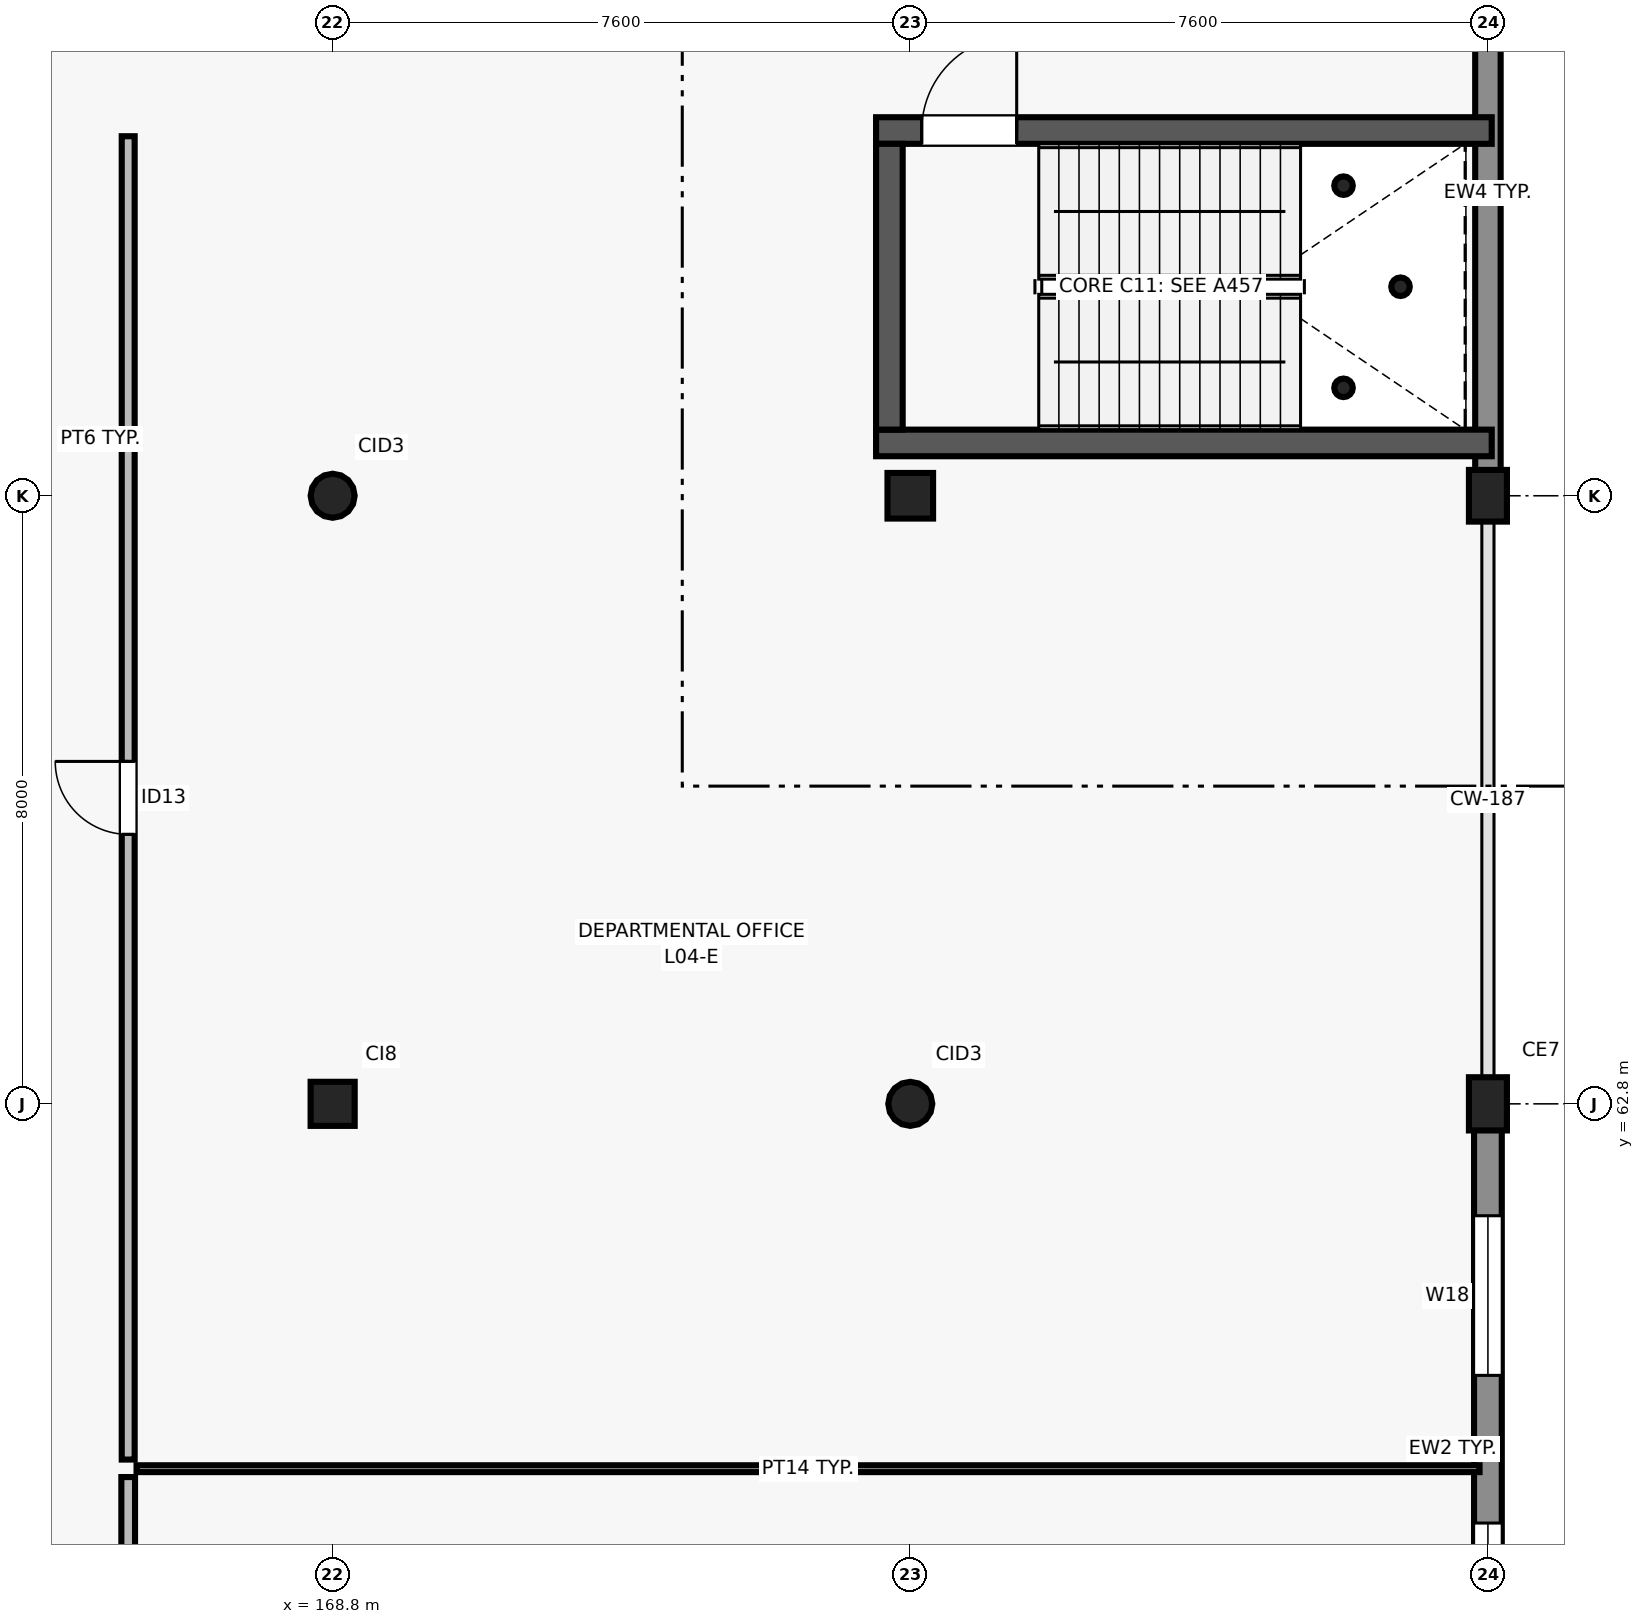
"""IFC4 building model, lengths in metres.
Left out: names, types, materials, properties, quantities, classifications, styles, units other than length and angle.
Written with IfcOpenShell. Run it as: python <this file> out.ifc"""

import sys

from ifc_helpers import new_model, si_unit, direction, frame, frame_2d, origin, origin_2d, place, context, subcontext, project, spatial, rectangle, circle, hollow_circle, extrude, element, fill, save


model = new_model("IFC4")
c1 = context("Model", 3, precision=1e-05, world=origin(), true_north=direction((0.0, 1.0)))
c2 = subcontext(c1, "Body", "Model", "MODEL_VIEW")
j1 = project(units=[si_unit("LENGTHUNIT", "METRE"), si_unit("PLANEANGLEUNIT", "RADIAN")], contexts=[c1])
p1 = place(None, origin())
s1 = spatial("IfcSite", under=j1, at=p1, CompositionType="ELEMENT")
p2 = place(p1, origin())
s2 = spatial("IfcBuilding", under=s1, at=p2, CompositionType="ELEMENT")
p3 = place(p2, frame((0.0, 0.0, 17.4)))
s3 = spatial("IfcBuildingStorey", under=s2, at=p3, CompositionType="ELEMENT", Elevation=17.4)
p4 = place(p3, frame((168.8, 62.8, 0.0), z_axis=(0.0, 0.0, 1.0), x_axis=(1.0, 0.0, 0.0)))
e1 = element("IfcColumn", 1, at=p4, inside=s3, PredefinedType="COLUMN", context=c2, shape_type="SweptSolid", body=[
    extrude(rectangle(XDim=0.58, YDim=0.58, at=origin_2d()), origin(), (0.0, 0.0, 1.0), 4.2),
])
for number, where, z_axis, x_axis in (
    (2, (168.8, 70.8, 0.0), (0.0, 0.0, 1.0), (1.0, 0.0, 0.0)),
    (3, (176.4, 62.8, 0.0), (0.0, 0.0, 1.0), (1.0, 0.0, 0.0)),
):
    element("IfcColumn", number, at=place(p3, frame(where, z_axis=z_axis, x_axis=x_axis)), inside=s3, PredefinedType="COLUMN", context=c2, shape_type="SweptSolid", body=[
        extrude(circle(Radius=0.29, at=origin_2d()), origin(), (0.0, 0.0, 1.0), 4.2),
    ])
p5 = place(p3, frame((176.4, 70.8, 0.0), z_axis=(0.0, 0.0, 1.0), x_axis=(1.0, 0.0, 0.0)))
e4 = element("IfcColumn", 4, at=p5, inside=s3, PredefinedType="COLUMN", context=c2, shape_type="SweptSolid", body=[
    extrude(rectangle(XDim=0.6, YDim=0.6, at=origin_2d()), origin(), (0.0, 0.0, 1.0), 4.2),
])
p6 = place(p3, frame((184.0, 62.8, 0.0), z_axis=(0.0, 0.0, 1.0), x_axis=(1.0, 0.0, 0.0)))
e5 = element("IfcColumn", 5, at=p6, inside=s3, PredefinedType="COLUMN", context=c2, shape_type="SweptSolid", body=[
    extrude(rectangle(XDim=0.7, YDim=0.5, at=origin_2d()), origin(), (0.0, 0.0, 1.0), 4.2),
])
p7 = place(p3, frame((184.0, 70.8, 0.0), z_axis=(0.0, 0.0, 1.0), x_axis=(1.0, 0.0, 0.0)))
e6 = element("IfcColumn", 6, at=p7, inside=s3, PredefinedType="COLUMN", context=c2, shape_type="SweptSolid", body=[
    extrude(rectangle(XDim=0.68, YDim=0.5, at=origin_2d()), origin(), (0.0, 0.0, 1.0), 4.2),
])
p8 = place(p3, frame((184.0, 55.069, 0.0), z_axis=(0.0, 0.0, 1.0), x_axis=(0.0, 1.0, 0.0)))
e7 = element("IfcWall", 7, at=p8, inside=s3, PredefinedType="SOLIDWALL", context=c2, shape_type="SweptSolid", body=[
    extrude(rectangle(XDim=7.486, YDim=0.365, at=frame_2d((3.743, 0.0))), origin(), (0.0, 0.0, 1.0), 3.53),
])
p9 = place(p8, frame((0.716, 0.0, 0.9)))
e8 = element("IfcOpeningElement", 8, at=p9, cuts=e7, PredefinedType="OPENING", context=c2, shape_type="SweptSolid", body=[
    extrude(rectangle(XDim=1.5, YDim=1.25, at=frame_2d((0.75, 0.625))), frame((0.0, 0.192, 0.0), z_axis=(0.0, -1.0, 0.0), x_axis=(1.0, 0.0, 0.0)), (0.0, 0.0, 1.0), 0.385),
])
p10 = place(p8, frame((4.159, 0.0, 0.9)))
e9 = element("IfcOpeningElement", 9, at=p10, cuts=e7, PredefinedType="OPENING", context=c2, shape_type="SweptSolid", body=[
    extrude(rectangle(XDim=2.1, YDim=1.25, at=frame_2d((1.05, 0.625))), frame((0.0, 0.192, 0.0), z_axis=(0.0, -1.0, 0.0), x_axis=(1.0, 0.0, 0.0)), (0.0, 0.0, 1.0), 0.385),
])
p11 = place(p3, frame((184.0, 71.045, 0.0), z_axis=(0.0, 0.0, 1.0), x_axis=(0.0, 1.0, 0.0)))
e10 = element("IfcWall", 10, at=p11, inside=s3, PredefinedType="SOLIDWALL", context=c2, shape_type="SweptSolid", body=[
    extrude(rectangle(XDim=7.486, YDim=0.335, at=frame_2d((3.743, 0.0))), origin(), (0.0, 0.0, 1.0), 3.92),
])
for number, where, z_axis, x_axis in (
    (11, (182.1, 72.22, 0.0), (0.0, 0.0, 1.0), (1.0, 0.0, 0.0)),
    (12, (182.1, 74.88, 0.0), (0.0, 0.0, 1.0), (1.0, 0.0, 0.0)),
    (13, (182.85, 73.55, 0.0), (0.0, 0.0, 1.0), (1.0, 0.0, 0.0)),
):
    element("IfcColumn", number, at=place(p3, frame(where, z_axis=z_axis, x_axis=x_axis)), inside=s3, PredefinedType="COLUMN", context=c2, shape_type="SweptSolid", body=[
        extrude(hollow_circle(Radius=0.122, WallThickness=0.01, at=origin_2d()), origin(), (0.0, 0.0, 1.0), 4.2),
    ])
p12 = place(p3, frame((175.95, 71.495, 0.0), z_axis=(0.0, 0.0, 1.0), x_axis=(1.0, 0.0, 0.0)))
e14 = element("IfcWall", 14, at=p12, inside=s3, PredefinedType="SHEAR", context=c2, shape_type="SweptSolid", body=[
    extrude(rectangle(XDim=8.1, YDim=0.35, at=frame_2d((4.05, 0.0))), origin(), (0.0, 0.0, 1.0), 3.92),
])
p13 = place(p3, frame((175.95, 75.605, 0.0), z_axis=(0.0, 0.0, 1.0), x_axis=(1.0, 0.0, 0.0)))
e15 = element("IfcWall", 15, at=p13, inside=s3, PredefinedType="SHEAR", context=c2, shape_type="SweptSolid", body=[
    extrude(rectangle(XDim=8.1, YDim=0.35, at=frame_2d((4.05, 0.0))), origin(), (0.0, 0.0, 1.0), 3.92),
])
p14 = place(p13, frame((0.6, 0.0, 0.0)))
e16 = element("IfcOpeningElement", 16, at=p14, cuts=e15, PredefinedType="OPENING", context=c2, shape_type="SweptSolid", body=[
    extrude(rectangle(XDim=1.25, YDim=2.2, at=frame_2d((0.625, 1.1))), frame((0.0, 0.185, 0.0), z_axis=(0.0, -1.0, 0.0), x_axis=(1.0, 0.0, 0.0)), (0.0, 0.0, 1.0), 0.37),
])
p15 = place(p3, frame((176.125, 71.67, 0.0), z_axis=(0.0, 0.0, 1.0), x_axis=(0.0, 1.0, 0.0)))
e17 = element("IfcWall", 17, at=p15, inside=s3, PredefinedType="SHEAR", context=c2, shape_type="SweptSolid", body=[
    extrude(rectangle(XDim=3.76, YDim=0.35, at=frame_2d((1.88, 0.0))), origin(), (0.0, 0.0, 1.0), 3.92),
])
p16 = place(p3, frame((166.22, 58.0, 0.0), z_axis=(0.0, 0.0, 1.0), x_axis=(1.0, 0.0, 0.0)))
e18 = element("IfcWall", 18, at=p16, inside=s3, PredefinedType="PARTITIONING", context=c2, shape_type="SweptSolid", body=[
    extrude(rectangle(XDim=17.67, YDim=0.09, at=frame_2d((8.835, 0.0))), origin(), (0.0, 0.0, 1.0), 3.9),
])
p17 = place(p3, frame((166.11, 38.91, 0.0), z_axis=(0.0, 0.0, 1.0), x_axis=(0.0, 1.0, 0.0)))
e19 = element("IfcWall", 19, at=p17, inside=s3, PredefinedType="PARTITIONING", context=c2, shape_type="SweptSolid", body=[
    extrude(rectangle(XDim=18.98, YDim=0.18, at=frame_2d((9.49, 0.0))), origin(), (0.0, 0.0, 1.0), 3.9),
])
p18 = place(p17, frame((8.665, 0.0, 0.0)))
e20 = element("IfcOpeningElement", 20, at=p18, cuts=e19, PredefinedType="OPENING", context=c2, shape_type="SweptSolid", body=[
    extrude(rectangle(XDim=1.65, YDim=2.3, at=frame_2d((0.825, 1.15))), frame((0.0, 0.1, 0.0), z_axis=(0.0, -1.0, 0.0), x_axis=(1.0, 0.0, 0.0)), (0.0, 0.0, 1.0), 0.2),
])
p19 = place(p3, frame((166.11, 58.12, 0.0), z_axis=(0.0, 0.0, 1.0), x_axis=(0.0, 1.0, 0.0)))
e21 = element("IfcWall", 21, at=p19, inside=s3, PredefinedType="PARTITIONING", context=c2, shape_type="SweptSolid", body=[
    extrude(rectangle(XDim=17.41, YDim=0.17, at=frame_2d((8.705, 0.0))), origin(), (0.0, 0.0, 1.0), 3.9),
])
p20 = place(p19, frame((8.225, 0.0, 0.0)))
e22 = element("IfcOpeningElement", 22, at=p20, cuts=e21, PredefinedType="OPENING", context=c2, shape_type="SweptSolid", body=[
    extrude(rectangle(XDim=0.96, YDim=2.15, at=frame_2d((0.48, 1.075))), frame((0.0, 0.095, 0.0), z_axis=(0.0, -1.0, 0.0), x_axis=(1.0, 0.0, 0.0)), (0.0, 0.0, 1.0), 0.19),
])
p21 = place(p9, origin())
e23 = element("IfcWindow", 23, at=p21, inside=s3, PartitioningType="SINGLE_PANEL", PredefinedType="WINDOW", context=c2, shape_type="SweptSolid", body=[
    extrude(rectangle(XDim=1.5, YDim=1.25, at=frame_2d((0.75, 0.625))), frame((0.0, 0.03, 0.0), z_axis=(0.0, -1.0, 0.0), x_axis=(1.0, 0.0, 0.0)), (0.0, 0.0, 1.0), 0.06),
])
fill(e8, e23)
p22 = place(p10, origin())
e24 = element("IfcWindow", 24, at=p22, inside=s3, PartitioningType="SINGLE_PANEL", PredefinedType="WINDOW", context=c2, shape_type="SweptSolid", body=[
    extrude(rectangle(XDim=2.1, YDim=1.25, at=frame_2d((1.05, 0.625))), frame((0.0, 0.03, 0.0), z_axis=(0.0, -1.0, 0.0), x_axis=(1.0, 0.0, 0.0)), (0.0, 0.0, 1.0), 0.06),
])
fill(e9, e24)
p23 = place(p14, origin())
e25 = element("IfcDoor", 25, at=p23, inside=s3, OperationType="SINGLE_SWING_RIGHT", PredefinedType="DOOR", context=c2, shape_type="SweptSolid", body=[
    extrude(rectangle(XDim=1.25, YDim=2.2, at=frame_2d((0.625, 1.1))), frame((0.0, 0.025, 0.0), z_axis=(0.0, -1.0, 0.0), x_axis=(1.0, 0.0, 0.0)), (0.0, 0.0, 1.0), 0.05),
])
fill(e16, e25)
p24 = place(p20, origin())
e26 = element("IfcDoor", 26, at=p24, inside=s3, OperationType="SINGLE_SWING_RIGHT", PredefinedType="DOOR", context=c2, shape_type="SweptSolid", body=[
    extrude(rectangle(XDim=0.96, YDim=2.15, at=frame_2d((0.48, 1.075))), frame((0.0, 0.025, 0.0), z_axis=(0.0, -1.0, 0.0), x_axis=(1.0, 0.0, 0.0)), (0.0, 0.0, 1.0), 0.05),
])
fill(e22, e26)
save(model, sys.argv[1])
